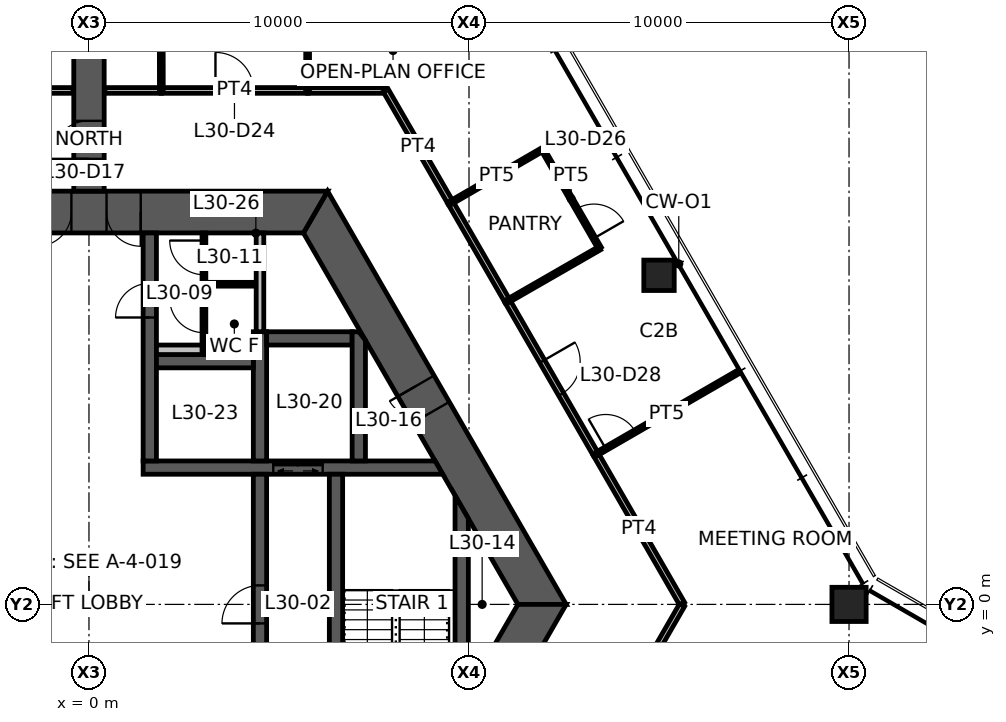
"""IFC4 building model, lengths in metres.
Left out: names, types, materials, properties, quantities, classifications, styles, units other than length and angle.
Written with IfcOpenShell. Run it as: python <this file> out.ifc"""

import sys

from ifc_helpers import new_model, si_unit, direction, frame, frame_2d, origin, origin_2d, place, context, subcontext, project, spatial, polyline, rectangle, hollow_rectangle, outline, extrude, element, fill, save


model = new_model("IFC4")
c1 = context("Model", 3, precision=1e-05, world=origin(), true_north=direction((0.0, 1.0)))
c2 = subcontext(c1, "Body", "Model", "MODEL_VIEW")
j1 = project(units=[si_unit("LENGTHUNIT", "METRE"), si_unit("PLANEANGLEUNIT", "RADIAN")], contexts=[c1])
p1 = place(None, origin())
s1 = spatial("IfcSite", under=j1, at=p1, CompositionType="ELEMENT")
p2 = place(p1, origin())
s2 = spatial("IfcBuilding", under=s1, at=p2, CompositionType="ELEMENT")
p3 = place(p2, frame((0.0, 0.0, 119.7)))
s3 = spatial("IfcBuildingStorey", under=s2, at=p3, CompositionType="ELEMENT", Elevation=119.7)
p4 = place(p3, frame((20.0, 0.0, 0.0), z_axis=(0.0, 0.0, 1.0), x_axis=(1.0, 0.0, 0.0)))
e1 = element("IfcColumn", 1, at=p4, inside=s3, PredefinedType="COLUMN", context=c2, shape_type="SweptSolid", body=[
    extrude(hollow_rectangle(XDim=0.9, YDim=0.9, WallThickness=0.07, at=origin_2d()), origin(), (0.0, 0.0, 1.0), 3.9),
])
p5 = place(p3, frame((15.0, 8.66, 0.0), z_axis=(0.0, 0.0, 1.0), x_axis=(1.0, 0.0, 0.0)))
e2 = element("IfcColumn", 2, at=p5, inside=s3, PredefinedType="COLUMN", context=c2, shape_type="SweptSolid", body=[
    extrude(hollow_rectangle(XDim=0.8, YDim=0.8, WallThickness=0.045, at=origin_2d()), origin(), (0.0, 0.0, 1.0), 3.9),
])
p6 = place(p3, frame((11.922, 0.0, 0.0), z_axis=(0.0, 0.0, 1.0), x_axis=(-0.500004296715, 0.866022923061, 0.0)))
e3 = element("IfcWall", 3, at=p6, inside=s3, PredefinedType="SHEAR", context=c2, shape_type="SweptSolid", body=[
    extrude(outline(polyline([(-0.318, -0.55), (5.835, -0.55), (6.635, -0.55), (12.24, -0.55), (11.605, 0.55), (6.635, 0.55), (5.835, 0.55), (0.318, 0.55), (-0.318, -0.55)])), origin(), (0.0, 0.0, 1.0), 3.9),
])
p7 = place(p6, frame((5.835, 0.0, 0.0)))
e4 = element("IfcOpeningElement", 4, at=p7, cuts=e3, PredefinedType="OPENING", context=c2, shape_type="SweptSolid", body=[
    extrude(rectangle(XDim=0.8, YDim=2.1, at=frame_2d((0.4, 1.05))), frame((0.0, 0.56, 0.0), z_axis=(0.0, -1.0, 0.0), x_axis=(1.0, 0.0, 0.0)), (0.0, 0.0, 1.0), 1.12),
])
p8 = place(p3, frame((5.961, 10.325, 0.0), z_axis=(0.0, 0.0, 1.0), x_axis=(-1.0, 0.0, 0.0)))
e5 = element("IfcWall", 5, at=p8, inside=s3, PredefinedType="SHEAR", context=c2, shape_type="SweptSolid", body=[
    extrude(outline(polyline([(-0.318, -0.55), (4.599, -0.55), (5.499, -0.55), (6.424, -0.55), (7.323, -0.55), (12.24, -0.55), (11.605, 0.55), (7.323, 0.55), (6.424, 0.55), (5.499, 0.55), (4.599, 0.55), (0.318, 0.55), (-0.318, -0.55)])), origin(), (0.0, 0.0, 1.0), 3.9),
])
p9 = place(p8, frame((6.424, 0.0, 0.0)))
e6 = element("IfcOpeningElement", 6, at=p9, cuts=e5, PredefinedType="OPENING", context=c2, shape_type="SweptSolid", body=[
    extrude(rectangle(XDim=0.9, YDim=2.1, at=frame_2d((0.45, 1.05))), frame((0.0, 0.56, 0.0), z_axis=(0.0, -1.0, 0.0), x_axis=(1.0, 0.0, 0.0)), (0.0, 0.0, 1.0), 1.12),
])
p10 = place(p8, frame((4.599, 0.0, 0.0)))
e7 = element("IfcOpeningElement", 7, at=p10, cuts=e5, PredefinedType="OPENING", context=c2, shape_type="SweptSolid", body=[
    extrude(rectangle(XDim=0.9, YDim=2.1, at=frame_2d((0.45, 1.05))), frame((0.0, 0.56, 0.0), z_axis=(0.0, -1.0, 0.0), x_axis=(1.0, 0.0, 0.0)), (0.0, 0.0, 1.0), 1.12),
])
p11 = place(p3, frame((5.961, -10.325, 0.0), z_axis=(0.0, 0.0, 1.0), x_axis=(0.500004296715, 0.866022923061, 0.0)))
e8 = element("IfcWall", 8, at=p11, inside=s3, PredefinedType="SHEAR", context=c2, shape_type="SweptSolid", body=[
    extrude(outline(polyline([(-0.318, -0.55), (4.594, -0.55), (5.394, -0.55), (12.24, -0.55), (11.605, 0.55), (5.394, 0.55), (4.594, 0.55), (0.318, 0.55), (-0.318, -0.55)])), origin(), (0.0, 0.0, 1.0), 3.9),
])
p12 = place(p11, frame((4.594, 0.0, 0.0)))
e9 = element("IfcOpeningElement", 9, at=p12, cuts=e8, PredefinedType="OPENING", context=c2, shape_type="SweptSolid", body=[
    extrude(rectangle(XDim=0.8, YDim=2.1, at=frame_2d((0.4, 1.05))), frame((0.0, 0.56, 0.0), z_axis=(0.0, -1.0, 0.0), x_axis=(1.0, 0.0, 0.0)), (0.0, 0.0, 1.0), 1.12),
])
p13 = place(p3, frame((0.0, 10.875, 0.0), z_axis=(0.0, 0.0, 1.0), x_axis=(0.0, 1.0, 0.0)))
e10 = element("IfcWall", 10, at=p13, inside=s3, PredefinedType="SHEAR", context=c2, shape_type="SweptSolid", body=[
    extrude(rectangle(XDim=7.646, YDim=0.8, at=frame_2d((3.823, 0.0))), origin(), (0.0, 0.0, 1.0), 3.9),
])
p14 = place(p13, frame((0.85, 0.0, 0.0)))
e11 = element("IfcOpeningElement", 11, at=p14, cuts=e10, PredefinedType="OPENING", context=c2, shape_type="SweptSolid", body=[
    extrude(rectangle(XDim=1.0, YDim=2.1, at=frame_2d((0.5, 1.05))), frame((0.0, 0.41, 0.0), z_axis=(0.0, -1.0, 0.0), x_axis=(1.0, 0.0, 0.0)), (0.0, 0.0, 1.0), 0.82),
])
p15 = place(p3, frame((1.425, 3.6, 0.0), z_axis=(0.0, 0.0, 1.0), x_axis=(1.0, 0.0, 0.0)))
e12 = element("IfcWall", 12, at=p15, inside=s3, PredefinedType="SHEAR", context=c2, shape_type="SweptSolid", body=[
    extrude(outline(polyline([(0.0, -0.175), (3.425, -0.175), (4.725, -0.175), (7.885, -0.175), (7.683, 0.175), (4.725, 0.175), (3.425, 0.175), (0.0, 0.175), (0.0, -0.175)])), origin(), (0.0, 0.0, 1.0), 3.9),
])
p16 = place(p15, frame((3.425, 0.0, 0.0)))
e13 = element("IfcOpeningElement", 13, at=p16, cuts=e12, PredefinedType="OPENING", context=c2, shape_type="SweptSolid", body=[
    extrude(rectangle(XDim=1.3, YDim=2.1, at=frame_2d((0.65, 1.05))), frame((0.0, 0.185, 0.0), z_axis=(0.0, -1.0, 0.0), x_axis=(1.0, 0.0, 0.0)), (0.0, 0.0, 1.0), 0.37),
])
p17 = place(p3, frame((1.6, 3.775, 0.0), z_axis=(0.0, 0.0, 1.0), x_axis=(0.0, 1.0, 0.0)))
e14 = element("IfcWall", 14, at=p17, inside=s3, PredefinedType="SHEAR", context=c2, shape_type="SweptSolid", body=[
    extrude(rectangle(XDim=6.0, YDim=0.35, at=frame_2d((3.0, 0.0))), origin(), (0.0, 0.0, 1.0), 3.9),
])
p18 = place(p17, frame((3.775, 0.0, 0.0)))
e15 = element("IfcOpeningElement", 15, at=p18, cuts=e14, PredefinedType="OPENING", context=c2, shape_type="SweptSolid", body=[
    extrude(rectangle(XDim=0.9, YDim=2.1, at=frame_2d((0.45, 1.05))), frame((0.0, 0.185, 0.0), z_axis=(0.0, -1.0, 0.0), x_axis=(1.0, 0.0, 0.0)), (0.0, 0.0, 1.0), 0.37),
])
p19 = place(p3, frame((4.5, -3.425, 0.0), z_axis=(0.0, 0.0, 1.0), x_axis=(0.0, 1.0, 0.0)))
e16 = element("IfcWall", 16, at=p19, inside=s3, PredefinedType="SHEAR", context=c2, shape_type="SweptSolid", body=[
    extrude(rectangle(XDim=6.85, YDim=0.35, at=frame_2d((3.425, 0.0))), origin(), (0.0, 0.0, 1.0), 3.9),
])
p20 = place(p19, frame((2.925, 0.0, 0.0)))
e17 = element("IfcOpeningElement", 17, at=p20, cuts=e16, PredefinedType="OPENING", context=c2, shape_type="SweptSolid", body=[
    extrude(rectangle(XDim=1.0, YDim=2.1, at=frame_2d((0.5, 1.05))), frame((0.0, 0.185, 0.0), z_axis=(0.0, -1.0, 0.0), x_axis=(1.0, 0.0, 0.0)), (0.0, 0.0, 1.0), 0.37),
])
p21 = place(p3, frame((6.5, -3.425, 0.0), z_axis=(0.0, 0.0, 1.0), x_axis=(0.0, 1.0, 0.0)))
e18 = element("IfcWall", 18, at=p21, inside=s3, PredefinedType="SHEAR", context=c2, shape_type="SweptSolid", body=[
    extrude(rectangle(XDim=6.85, YDim=0.35, at=frame_2d((3.425, 0.0))), origin(), (0.0, 0.0, 1.0), 3.9),
])
p22 = place(p21, frame((0.1, 0.0, 0.0)))
e19 = element("IfcOpeningElement", 19, at=p22, cuts=e18, PredefinedType="OPENING", context=c2, shape_type="SweptSolid", body=[
    extrude(rectangle(XDim=1.0, YDim=2.1, at=frame_2d((0.5, 1.05))), frame((0.0, 0.185, 0.0), z_axis=(0.0, -1.0, 0.0), x_axis=(1.0, 0.0, 0.0)), (0.0, 0.0, 1.0), 0.37),
])
p23 = place(p3, frame((4.5, 3.775, 0.0), z_axis=(0.0, 0.0, 1.0), x_axis=(0.0, 1.0, 0.0)))
e20 = element("IfcWall", 20, at=p23, inside=s3, PredefinedType="SHEAR", context=c2, shape_type="SweptSolid", body=[
    extrude(rectangle(XDim=3.4, YDim=0.35, at=frame_2d((1.7, 0.0))), origin(), (0.0, 0.0, 1.0), 3.9),
])
p24 = place(p3, frame((1.775, 6.4, 0.0), z_axis=(0.0, 0.0, 1.0), x_axis=(1.0, 0.0, 0.0)))
e21 = element("IfcWall", 21, at=p24, inside=s3, PredefinedType="SHEAR", context=c2, shape_type="SweptSolid", body=[
    extrude(rectangle(XDim=2.55, YDim=0.35, at=frame_2d((1.275, 0.0))), origin(), (0.0, 0.0, 1.0), 3.9),
])
p25 = place(p3, frame((4.675, 7.0, 0.0), z_axis=(0.0, 0.0, 1.0), x_axis=(1.0, 0.0, 0.0)))
e22 = element("IfcWall", 22, at=p25, inside=s3, PredefinedType="SHEAR", context=c2, shape_type="SweptSolid", body=[
    extrude(rectangle(XDim=2.25, YDim=0.35, at=frame_2d((1.125, 0.0))), origin(), (0.0, 0.0, 1.0), 3.9),
])
p26 = place(p3, frame((7.1, 3.775, 0.0), z_axis=(0.0, 0.0, 1.0), x_axis=(0.0, 1.0, 0.0)))
e23 = element("IfcWall", 23, at=p26, inside=s3, PredefinedType="SHEAR", context=c2, shape_type="SweptSolid", body=[
    extrude(outline(polyline([(0.0, -0.175), (3.175, -0.175), (3.4, 0.0), (3.4, 0.175), (0.0, 0.175), (0.0, -0.175)])), origin(), (0.0, 0.0, 1.0), 3.9),
])
p27 = place(p3, frame((9.808, -2.562, 0.0), z_axis=(0.0, 0.0, 1.0), x_axis=(0.0, 1.0, 0.0)))
e24 = element("IfcWall", 24, at=p27, inside=s3, PredefinedType="SHEAR", context=c2, shape_type="SweptSolid", body=[
    extrude(outline(polyline([(0.303, -0.175), (4.821, -0.175), (5.428, 0.175), (-0.303, 0.175), (0.303, -0.175)])), origin(), (0.0, 0.0, 1.0), 3.9),
])
p28 = place(p3, frame((4.5, 7.175, 0.0), z_axis=(0.0, 0.0, 1.0), x_axis=(0.0, 1.0, 0.0)))
e25 = element("IfcWall", 25, at=p28, inside=s3, PredefinedType="STANDARD", context=c2, shape_type="SweptSolid", body=[
    extrude(rectangle(XDim=2.6, YDim=0.2, at=frame_2d((1.3, 0.0))), origin(), (0.0, 0.0, 1.0), 3.9),
])
p29 = place(p3, frame((1.775, 6.7, 0.0), z_axis=(0.0, 0.0, 1.0), x_axis=(1.0, 0.0, 0.0)))
e26 = element("IfcWall", 26, at=p29, inside=s3, PredefinedType="PLUMBINGWALL", context=c2, shape_type="SweptSolid", body=[
    extrude(rectangle(XDim=2.55, YDim=0.25, at=frame_2d((1.275, 0.0))), origin(), (0.0, 0.0, 1.0), 3.9),
])
p30 = place(p3, frame((3.025, 6.575, 0.0), z_axis=(0.0, 0.0, 1.0), x_axis=(0.0, 1.0, 0.0)))
e27 = element("IfcWall", 27, at=p30, inside=s3, PredefinedType="PARTITIONING", context=c2, shape_type="SweptSolid", body=[
    extrude(rectangle(XDim=3.2, YDim=0.1, at=frame_2d((1.6, 0.0))), origin(), (0.0, 0.0, 1.0), 2.35),
])
p31 = place(p30, frame((0.575, 0.0, 0.0)))
e28 = element("IfcOpeningElement", 28, at=p31, cuts=e27, PredefinedType="OPENING", context=c2, shape_type="SweptSolid", body=[
    extrude(rectangle(XDim=0.9, YDim=2.1, at=frame_2d((0.45, 1.05))), frame((0.0, 0.06, 0.0), z_axis=(0.0, -1.0, 0.0), x_axis=(1.0, 0.0, 0.0)), (0.0, 0.0, 1.0), 0.12),
])
p32 = place(p30, frame((2.1, 0.0, 0.0)))
e29 = element("IfcOpeningElement", 29, at=p32, cuts=e27, PredefinedType="OPENING", context=c2, shape_type="SweptSolid", body=[
    extrude(rectangle(XDim=0.9, YDim=2.1, at=frame_2d((0.45, 1.05))), frame((0.0, 0.06, 0.0), z_axis=(0.0, -1.0, 0.0), x_axis=(1.0, 0.0, 0.0)), (0.0, 0.0, 1.0), 0.12),
])
p33 = place(p3, frame((3.075, 8.425, 0.0), z_axis=(0.0, 0.0, 1.0), x_axis=(1.0, 0.0, 0.0)))
e30 = element("IfcWall", 30, at=p33, inside=s3, PredefinedType="PARTITIONING", context=c2, shape_type="SweptSolid", body=[
    extrude(rectangle(XDim=1.25, YDim=0.1, at=frame_2d((0.625, 0.0))), origin(), (0.0, 0.0, 1.0), 2.35),
])
p34 = place(p3, frame((1.895, 13.525, 0.0), z_axis=(0.0, 0.0, 1.0), x_axis=(1.0, 0.0, 0.0)))
e31 = element("IfcWall", 31, at=p34, inside=s3, PredefinedType="PARTITIONING", context=c2, shape_type="SweptSolid", body=[
    extrude(rectangle(XDim=3.867, YDim=0.15, at=frame_2d((1.934, 0.0))), origin(), (0.0, 0.0, 1.0), 2.35),
])
p35 = place(p34, frame((1.434, 0.0, 0.0)))
e32 = element("IfcOpeningElement", 32, at=p35, cuts=e31, PredefinedType="OPENING", context=c2, shape_type="SweptSolid", body=[
    extrude(rectangle(XDim=1.0, YDim=2.1, at=frame_2d((0.5, 1.05))), frame((0.0, 0.085, 0.0), z_axis=(0.0, -1.0, 0.0), x_axis=(1.0, 0.0, 0.0)), (0.0, 0.0, 1.0), 0.17),
])
p36 = place(p3, frame((9.51, 10.577, 0.0), z_axis=(0.0, 0.0, 1.0), x_axis=(0.499977562641, -0.866038357612, 0.0)))
e33 = element("IfcWall", 33, at=p36, inside=s3, PredefinedType="PARTITIONING", context=c2, shape_type="SweptSolid", body=[
    extrude(rectangle(XDim=3.01, YDim=0.15, at=frame_2d((1.505, 0.0))), origin(), (0.0, 0.0, 1.0), 2.35),
])
p37 = place(p3, frame((13.334, 3.955, 0.0), z_axis=(0.0, 0.0, 1.0), x_axis=(0.499987549055, -0.866032592222, 0.0)))
e34 = element("IfcWall", 34, at=p37, inside=s3, PredefinedType="PARTITIONING", context=c2, shape_type="SweptSolid", body=[
    extrude(rectangle(XDim=4.544, YDim=0.15, at=frame_2d((2.272, 0.0))), origin(), (0.0, 0.0, 1.0), 2.35),
])
p38 = place(p3, frame((0.42, 13.525, 0.0), z_axis=(0.0, 0.0, 1.0), x_axis=(1.0, 0.0, 0.0)))
e35 = element("IfcWall", 35, at=p38, inside=s3, PredefinedType="PARTITIONING", context=c2, shape_type="SweptSolid", body=[
    extrude(rectangle(XDim=1.485, YDim=0.15, at=frame_2d((0.742, 0.0))), origin(), (0.0, 0.0, 1.0), 2.35),
])
p39 = place(p3, frame((5.752, 13.525, 0.0), z_axis=(0.0, 0.0, 1.0), x_axis=(1.0, 0.0, 0.0)))
e36 = element("IfcWall", 36, at=p39, inside=s3, PredefinedType="PARTITIONING", context=c2, shape_type="SweptSolid", body=[
    extrude(rectangle(XDim=2.056, YDim=0.15, at=frame_2d((1.028, 0.0))), origin(), (0.0, 0.0, 1.0), 2.35),
])
p40 = place(p3, frame((7.809, 13.525, 0.0), z_axis=(0.0, 0.0, 1.0), x_axis=(0.500001088571, -0.866024775297, 0.0)))
e37 = element("IfcWall", 37, at=p40, inside=s3, PredefinedType="PARTITIONING", context=c2, shape_type="SweptSolid", body=[
    extrude(rectangle(XDim=3.413, YDim=0.15, at=frame_2d((1.707, 0.0))), origin(), (0.0, 0.0, 1.0), 2.35),
])
p41 = place(p3, frame((11.011, 7.979, 0.0), z_axis=(0.0, 0.0, 1.0), x_axis=(0.500008456887, -0.866020521143, 0.0)))
e38 = element("IfcWall", 38, at=p41, inside=s3, PredefinedType="PARTITIONING", context=c2, shape_type="SweptSolid", body=[
    extrude(rectangle(XDim=4.655, YDim=0.15, at=frame_2d((2.328, 0.0))), origin(), (0.0, 0.0, 1.0), 2.35),
])
p42 = place(p41, frame((1.828, 0.0, 0.0)))
e39 = element("IfcOpeningElement", 39, at=p42, cuts=e38, PredefinedType="OPENING", context=c2, shape_type="SweptSolid", body=[
    extrude(rectangle(XDim=1.0, YDim=2.1, at=frame_2d((0.5, 1.05))), frame((0.0, 0.085, 0.0), z_axis=(0.0, -1.0, 0.0), x_axis=(1.0, 0.0, 0.0)), (0.0, 0.0, 1.0), 0.17),
])
for number, where, z_axis, x_axis in (
    (40, (1.905, 13.525, 0.0), (0.0, 0.0, 1.0), (-0.002, 1.0, 0.0)),
    (41, (5.757, 16.325, 0.0), (0.0, 0.0, 1.0), (-0.002, -1.0, 0.0)),
    (42, (9.515, 10.569, 0.0), (0.0, 0.0, 1.0), (0.865, 0.501, 0.0)),
):
    element("IfcWall", number, at=place(p3, frame(where, z_axis=z_axis, x_axis=x_axis)), inside=s3, PredefinedType="PARTITIONING", context=c2, shape_type="SweptSolid", body=[
        extrude(rectangle(XDim=2.8, YDim=0.1, at=frame_2d((1.4, 0.0))), origin(), (0.0, 0.0, 1.0), 2.35),
    ])
p43 = place(p3, frame((11.938, 11.973, 0.0), z_axis=(0.0, 0.0, 1.0), x_axis=(0.50002537861, -0.866010750942, 0.0)))
e43 = element("IfcWall", 43, at=p43, inside=s3, PredefinedType="PARTITIONING", context=c2, shape_type="SweptSolid", body=[
    extrude(rectangle(XDim=3.0, YDim=0.1, at=frame_2d((1.5, 0.0))), origin(), (0.0, 0.0, 1.0), 2.35),
])
p44 = place(p43, frame((1.8, 0.0, 0.0)))
e44 = element("IfcOpeningElement", 44, at=p44, cuts=e43, PredefinedType="OPENING", context=c2, shape_type="SweptSolid", body=[
    extrude(rectangle(XDim=0.9, YDim=2.1, at=frame_2d((0.45, 1.05))), frame((0.0, 0.06, 0.0), z_axis=(0.0, -1.0, 0.0), x_axis=(1.0, 0.0, 0.0)), (0.0, 0.0, 1.0), 0.12),
])
p45 = place(p3, frame((13.438, 9.375, 0.0), z_axis=(0.0, 0.0, 1.0), x_axis=(-0.866817750494, -0.498625097071, 0.0)))
e45 = element("IfcWall", 45, at=p45, inside=s3, PredefinedType="PARTITIONING", context=c2, shape_type="SweptSolid", body=[
    extrude(rectangle(XDim=2.8, YDim=0.1, at=frame_2d((1.4, 0.0))), origin(), (0.0, 0.0, 1.0), 2.35),
])
p46 = place(p3, frame((13.338, 3.947, 0.0), z_axis=(0.0, 0.0, 1.0), x_axis=(0.865505397626, 0.500899597405, 0.0)))
e46 = element("IfcWall", 46, at=p46, inside=s3, PredefinedType="PARTITIONING", context=c2, shape_type="SweptSolid", body=[
    extrude(rectangle(XDim=4.295, YDim=0.1, at=frame_2d((2.148, 0.0))), origin(), (0.0, 0.0, 1.0), 2.35),
])
p47 = place(p46, frame((0.3, 0.0, 0.0)))
e47 = element("IfcOpeningElement", 47, at=p47, cuts=e46, PredefinedType="OPENING", context=c2, shape_type="SweptSolid", body=[
    extrude(rectangle(XDim=0.9, YDim=2.1, at=frame_2d((0.45, 1.05))), frame((0.0, 0.06, 0.0), z_axis=(0.0, -1.0, 0.0), x_axis=(1.0, 0.0, 0.0)), (0.0, 0.0, 1.0), 0.12),
])
p48 = place(p3, frame((-1.905, 13.525, 0.0), z_axis=(0.0, 0.0, 1.0), x_axis=(1.0, 0.0, 0.0)))
e48 = element("IfcWall", 48, at=p48, inside=s3, PredefinedType="PARTITIONING", context=c2, shape_type="SweptSolid", body=[
    extrude(rectangle(XDim=1.485, YDim=0.15, at=frame_2d((0.742, 0.0))), origin(), (0.0, 0.0, 1.0), 2.35),
])
p49 = place(p3, frame((15.606, -0.02, 0.0), z_axis=(0.0, 0.0, 1.0), x_axis=(-0.499989298045, -0.866031582473, 0.0)))
e49 = element("IfcWall", 49, at=p49, inside=s3, PredefinedType="PARTITIONING", context=c2, shape_type="SweptSolid", body=[
    extrude(rectangle(XDim=7.365, YDim=0.15, at=frame_2d((3.683, 0.0))), origin(), (0.0, 0.0, 1.0), 2.35),
])
p50 = place(p49, frame((3.183, 0.0, 0.0)))
e50 = element("IfcOpeningElement", 50, at=p50, cuts=e49, PredefinedType="OPENING", context=c2, shape_type="SweptSolid", body=[
    extrude(rectangle(XDim=1.0, YDim=2.1, at=frame_2d((0.5, 1.05))), frame((0.0, 0.085, 0.0), z_axis=(0.0, -1.0, 0.0), x_axis=(1.0, 0.0, 0.0)), (0.0, 0.0, 1.0), 0.17),
])
p51 = place(p9, origin())
e51 = element("IfcDoor", 51, at=p51, inside=s3, OperationType="SINGLE_SWING_RIGHT", PredefinedType="DOOR", context=c2, shape_type="SweptSolid", body=[
    extrude(rectangle(XDim=0.9, YDim=2.1, at=frame_2d((0.45, 1.05))), frame((0.0, 0.025, 0.0), z_axis=(0.0, -1.0, 0.0), x_axis=(1.0, 0.0, 0.0)), (0.0, 0.0, 1.0), 0.05),
])
fill(e6, e51)
p52 = place(p10, origin())
e52 = element("IfcDoor", 52, at=p52, inside=s3, OperationType="SINGLE_SWING_LEFT", PredefinedType="DOOR", context=c2, shape_type="SweptSolid", body=[
    extrude(rectangle(XDim=0.9, YDim=2.1, at=frame_2d((0.45, 1.05))), frame((0.0, 0.025, 0.0), z_axis=(0.0, -1.0, 0.0), x_axis=(1.0, 0.0, 0.0)), (0.0, 0.0, 1.0), 0.05),
])
fill(e7, e52)
p53 = place(p7, origin())
e53 = element("IfcDoor", 53, at=p53, inside=s3, OperationType="SINGLE_SWING_RIGHT", PredefinedType="DOOR", context=c2, shape_type="SweptSolid", body=[
    extrude(rectangle(XDim=0.8, YDim=2.1, at=frame_2d((0.4, 1.05))), frame((0.0, 0.025, 0.0), z_axis=(0.0, -1.0, 0.0), x_axis=(1.0, 0.0, 0.0)), (0.0, 0.0, 1.0), 0.05),
])
fill(e4, e53)
p54 = place(p20, origin())
e54 = element("IfcDoor", 54, at=p54, inside=s3, OperationType="SINGLE_SWING_LEFT", PredefinedType="DOOR", context=c2, shape_type="SweptSolid", body=[
    extrude(rectangle(XDim=1.0, YDim=2.1, at=frame_2d((0.5, 1.05))), frame((0.0, 0.025, 0.0), z_axis=(0.0, -1.0, 0.0), x_axis=(1.0, 0.0, 0.0)), (0.0, 0.0, 1.0), 0.05),
])
fill(e17, e54)
p55 = place(p18, origin())
e55 = element("IfcDoor", 55, at=p55, inside=s3, OperationType="SINGLE_SWING_LEFT", PredefinedType="DOOR", context=c2, shape_type="SweptSolid", body=[
    extrude(rectangle(XDim=0.9, YDim=2.1, at=frame_2d((0.45, 1.05))), frame((0.0, 0.025, 0.0), z_axis=(0.0, -1.0, 0.0), x_axis=(1.0, 0.0, 0.0)), (0.0, 0.0, 1.0), 0.05),
])
fill(e15, e55)
p56 = place(p14, origin())
e56 = element("IfcDoor", 56, at=p56, inside=s3, OperationType="SINGLE_SWING_LEFT", PredefinedType="DOOR", context=c2, shape_type="SweptSolid", body=[
    extrude(rectangle(XDim=1.0, YDim=2.1, at=frame_2d((0.5, 1.05))), frame((0.0, 0.025, 0.0), z_axis=(0.0, -1.0, 0.0), x_axis=(1.0, 0.0, 0.0)), (0.0, 0.0, 1.0), 0.05),
])
fill(e11, e56)
p57 = place(p31, origin())
e57 = element("IfcDoor", 57, at=p57, inside=s3, OperationType="SINGLE_SWING_RIGHT", PredefinedType="DOOR", context=c2, shape_type="SweptSolid", body=[
    extrude(rectangle(XDim=0.9, YDim=2.1, at=frame_2d((0.45, 1.05))), frame((0.0, 0.025, 0.0), z_axis=(0.0, -1.0, 0.0), x_axis=(1.0, 0.0, 0.0)), (0.0, 0.0, 1.0), 0.05),
])
fill(e28, e57)
p58 = place(p32, origin())
e58 = element("IfcDoor", 58, at=p58, inside=s3, OperationType="SINGLE_SWING_RIGHT", PredefinedType="DOOR", context=c2, shape_type="SweptSolid", body=[
    extrude(rectangle(XDim=0.9, YDim=2.1, at=frame_2d((0.45, 1.05))), frame((0.0, 0.025, 0.0), z_axis=(0.0, -1.0, 0.0), x_axis=(1.0, 0.0, 0.0)), (0.0, 0.0, 1.0), 0.05),
])
fill(e29, e58)
p59 = place(p35, origin())
e59 = element("IfcDoor", 59, at=p59, inside=s3, OperationType="SINGLE_SWING_LEFT", PredefinedType="DOOR", context=c2, shape_type="SweptSolid", body=[
    extrude(rectangle(XDim=1.0, YDim=2.1, at=frame_2d((0.5, 1.05))), frame((0.0, 0.025, 0.0), z_axis=(0.0, -1.0, 0.0), x_axis=(1.0, 0.0, 0.0)), (0.0, 0.0, 1.0), 0.05),
])
fill(e32, e59)
p60 = place(p42, origin())
e60 = element("IfcDoor", 60, at=p60, inside=s3, OperationType="SINGLE_SWING_LEFT", PredefinedType="DOOR", context=c2, shape_type="SweptSolid", body=[
    extrude(rectangle(XDim=1.0, YDim=2.1, at=frame_2d((0.5, 1.05))), frame((0.0, 0.025, 0.0), z_axis=(0.0, -1.0, 0.0), x_axis=(1.0, 0.0, 0.0)), (0.0, 0.0, 1.0), 0.05),
])
fill(e39, e60)
p61 = place(p44, origin())
e61 = element("IfcDoor", 61, at=p61, inside=s3, OperationType="SINGLE_SWING_RIGHT", PredefinedType="DOOR", context=c2, shape_type="SweptSolid", body=[
    extrude(rectangle(XDim=0.9, YDim=2.1, at=frame_2d((0.45, 1.05))), frame((0.0, 0.025, 0.0), z_axis=(0.0, -1.0, 0.0), x_axis=(1.0, 0.0, 0.0)), (0.0, 0.0, 1.0), 0.05),
])
fill(e44, e61)
p62 = place(p47, origin())
e62 = element("IfcDoor", 62, at=p62, inside=s3, OperationType="SINGLE_SWING_LEFT", PredefinedType="DOOR", context=c2, shape_type="SweptSolid", body=[
    extrude(rectangle(XDim=0.9, YDim=2.1, at=frame_2d((0.45, 1.05))), frame((0.0, 0.025, 0.0), z_axis=(0.0, -1.0, 0.0), x_axis=(1.0, 0.0, 0.0)), (0.0, 0.0, 1.0), 0.05),
])
fill(e47, e62)
p63 = place(p16, origin())
e63 = element("IfcDoor", 63, at=p63, inside=s3, OperationType="DOUBLE_DOOR_SLIDING", PredefinedType="DOOR", context=c2, shape_type="SweptSolid", body=[
    extrude(rectangle(XDim=1.3, YDim=2.1, at=frame_2d((0.65, 1.05))), frame((0.0, 0.025, 0.0), z_axis=(0.0, -1.0, 0.0), x_axis=(1.0, 0.0, 0.0)), (0.0, 0.0, 1.0), 0.05),
])
fill(e13, e63)
save(model, sys.argv[1])
